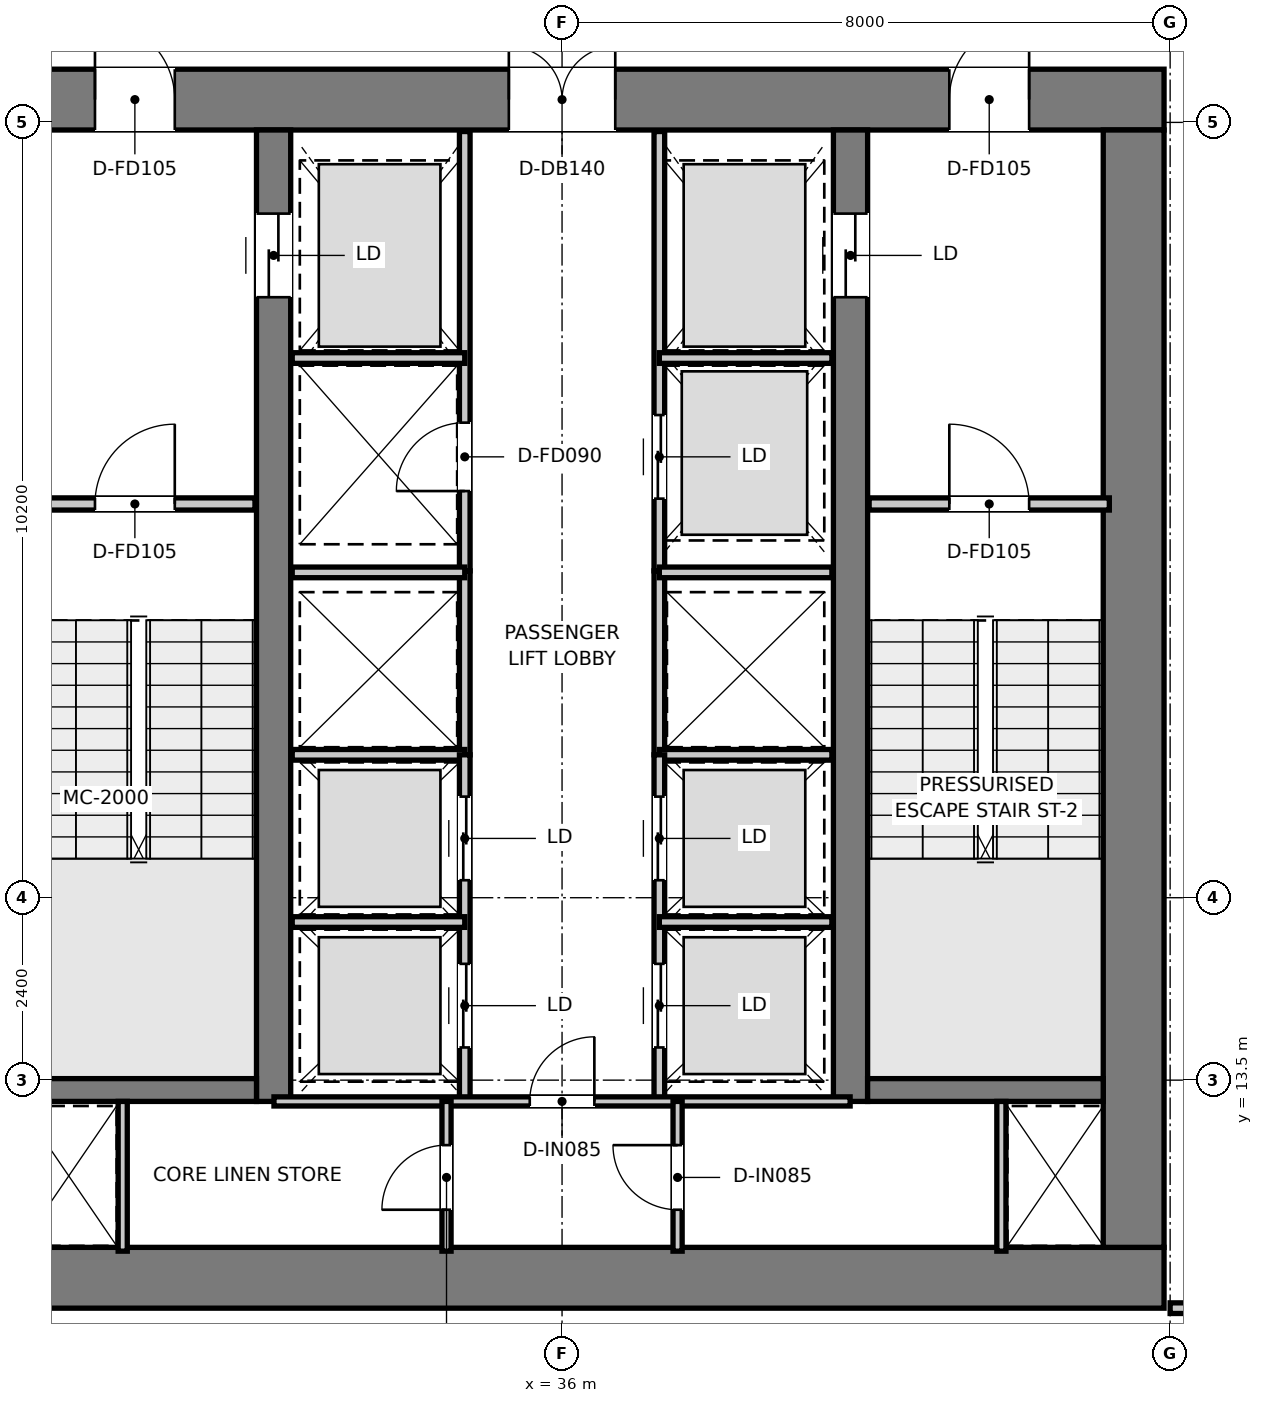
"""IFC4 building model, lengths in metres.
Left out: names, types, materials, properties, quantities, classifications, styles, units other than length and angle.
Written with IfcOpenShell. Run it as: python <this file> out.ifc"""

import sys

from ifc_helpers import new_model, si_unit, direction, frame, frame_2d, origin, place, context, subcontext, project, spatial, rectangle, extrude, element, fill, save


model = new_model("IFC4")
c1 = context("Model", 3, precision=1e-05, world=origin(), true_north=direction((0.0, 1.0)))
c2 = subcontext(c1, "Body", "Model", "MODEL_VIEW")
j1 = project(units=[si_unit("LENGTHUNIT", "METRE"), si_unit("PLANEANGLEUNIT", "RADIAN")], contexts=[c1])
p1 = place(None, origin())
s1 = spatial("IfcSite", under=j1, at=p1, CompositionType="ELEMENT")
p2 = place(p1, origin())
s2 = spatial("IfcBuilding", under=s1, at=p2, CompositionType="ELEMENT")
p3 = place(p2, frame((0.0, 0.0, 109.8)))
s3 = spatial("IfcBuildingStorey", under=s2, at=p3, CompositionType="ELEMENT", Elevation=109.8)
p4 = place(p3, frame((28.08, 10.9, 0.0), z_axis=(0.0, 0.0, 1.0), x_axis=(1.0, 0.0, 0.0)))
e1 = element("IfcWall", 1, at=p4, inside=s3, PredefinedType="SHEAR", context=c2, shape_type="SweptSolid", body=[
    extrude(rectangle(XDim=15.84, YDim=0.8, at=frame_2d((7.92, 0.0))), origin(), (0.0, 0.0, 1.0), 3.95),
])
p5 = place(p3, frame((28.08, 26.4, 0.0), z_axis=(0.0, 0.0, 1.0), x_axis=(1.0, 0.0, 0.0)))
e2 = element("IfcWall", 2, at=p5, inside=s3, PredefinedType="SHEAR", context=c2, shape_type="SweptSolid", body=[
    extrude(rectangle(XDim=15.84, YDim=0.8, at=frame_2d((7.92, 0.0))), origin(), (0.0, 0.0, 1.0), 3.95),
])
p6 = place(p5, frame((7.22, 0.0, 0.0)))
e3 = element("IfcOpeningElement", 3, at=p6, cuts=e2, PredefinedType="OPENING", context=c2, shape_type="SweptSolid", body=[
    extrude(rectangle(XDim=1.4, YDim=2.2, at=frame_2d((0.7, 1.1))), frame((0.0, 0.41, 0.0), z_axis=(0.0, -1.0, 0.0), x_axis=(1.0, 0.0, 0.0)), (0.0, 0.0, 1.0), 0.82),
])
p7 = place(p5, frame((1.775, 0.0, 0.0)))
e4 = element("IfcOpeningElement", 4, at=p7, cuts=e2, PredefinedType="OPENING", context=c2, shape_type="SweptSolid", body=[
    extrude(rectangle(XDim=1.05, YDim=2.1, at=frame_2d((0.525, 1.05))), frame((0.0, 0.41, 0.0), z_axis=(0.0, -1.0, 0.0), x_axis=(1.0, 0.0, 0.0)), (0.0, 0.0, 1.0), 0.82),
])
p8 = place(p5, frame((13.015, 0.0, 0.0)))
e5 = element("IfcOpeningElement", 5, at=p8, cuts=e2, PredefinedType="OPENING", context=c2, shape_type="SweptSolid", body=[
    extrude(rectangle(XDim=1.05, YDim=2.1, at=frame_2d((0.525, 1.05))), frame((0.0, 0.41, 0.0), z_axis=(0.0, -1.0, 0.0), x_axis=(1.0, 0.0, 0.0)), (0.0, 0.0, 1.0), 0.82),
])
p9 = place(p3, frame((43.52, 11.3, 0.0), z_axis=(0.0, 0.0, 1.0), x_axis=(0.0, 1.0, 0.0)))
e6 = element("IfcWall", 6, at=p9, inside=s3, PredefinedType="SHEAR", context=c2, shape_type="SweptSolid", body=[
    extrude(rectangle(XDim=14.7, YDim=0.8, at=frame_2d((7.35, 0.0))), origin(), (0.0, 0.0, 1.0), 3.95),
])
p10 = place(p3, frame((32.205, 13.22, 0.0), z_axis=(0.0, 0.0, 1.0), x_axis=(0.0, 1.0, 0.0)))
e7 = element("IfcWall", 7, at=p10, inside=s3, PredefinedType="SHEAR", context=c2, shape_type="SweptSolid", body=[
    extrude(rectangle(XDim=12.78, YDim=0.45, at=frame_2d((6.39, 0.0))), origin(), (0.0, 0.0, 1.0), 3.95),
])
p11 = place(p10, frame((10.58, 0.0, 0.0)))
e8 = element("IfcOpeningElement", 8, at=p11, cuts=e7, PredefinedType="OPENING", context=c2, shape_type="SweptSolid", body=[
    extrude(rectangle(XDim=1.1, YDim=2.15, at=frame_2d((0.55, 1.075))), frame((0.0, 0.235, 0.0), z_axis=(0.0, -1.0, 0.0), x_axis=(1.0, 0.0, 0.0)), (0.0, 0.0, 1.0), 0.47),
])
p12 = place(p3, frame((39.795, 13.22, 0.0), z_axis=(0.0, 0.0, 1.0), x_axis=(0.0, 1.0, 0.0)))
e9 = element("IfcWall", 9, at=p12, inside=s3, PredefinedType="SHEAR", context=c2, shape_type="SweptSolid", body=[
    extrude(rectangle(XDim=12.78, YDim=0.45, at=frame_2d((6.39, 0.0))), origin(), (0.0, 0.0, 1.0), 3.95),
])
p13 = place(p12, frame((10.58, 0.0, 0.0)))
e10 = element("IfcOpeningElement", 10, at=p13, cuts=e9, PredefinedType="OPENING", context=c2, shape_type="SweptSolid", body=[
    extrude(rectangle(XDim=1.1, YDim=2.15, at=frame_2d((0.55, 1.075))), frame((0.0, 0.235, 0.0), z_axis=(0.0, -1.0, 0.0), x_axis=(1.0, 0.0, 0.0)), (0.0, 0.0, 1.0), 0.47),
])
for number, where, z_axis, x_axis in (
    (11, (28.88, 13.37, 0.0), (0.0, 0.0, 1.0), (1.0, 0.0, 0.0)),
    (12, (40.02, 13.37, 0.0), (0.0, 0.0, 1.0), (1.0, 0.0, 0.0)),
):
    element("IfcWall", number, at=place(p3, frame(where, z_axis=z_axis, x_axis=x_axis)), inside=s3, PredefinedType="SHEAR", context=c2, shape_type="SweptSolid", body=[
        extrude(rectangle(XDim=3.1, YDim=0.3, at=frame_2d((1.55, 0.0))), origin(), (0.0, 0.0, 1.0), 3.95),
    ])
p14 = place(p3, frame((28.8, 21.08, 0.0), z_axis=(0.0, 0.0, 1.0), x_axis=(1.0, 0.0, 0.0)))
e13 = element("IfcWall", 13, at=p14, inside=s3, PredefinedType="PARTITIONING", context=c2, shape_type="SweptSolid", body=[
    extrude(rectangle(XDim=3.16, YDim=0.16, at=frame_2d((1.58, 0.0))), origin(), (0.0, 0.0, 1.0), 3.67),
])
p15 = place(p14, frame((1.055, 0.0, 0.0)))
e14 = element("IfcOpeningElement", 14, at=p15, cuts=e13, PredefinedType="OPENING", context=c2, shape_type="SweptSolid", body=[
    extrude(rectangle(XDim=1.05, YDim=2.1, at=frame_2d((0.525, 1.05))), frame((0.0, 0.09, 0.0), z_axis=(0.0, -1.0, 0.0), x_axis=(1.0, 0.0, 0.0)), (0.0, 0.0, 1.0), 0.18),
])
p16 = place(p3, frame((40.04, 21.08, 0.0), z_axis=(0.0, 0.0, 1.0), x_axis=(1.0, 0.0, 0.0)))
e15 = element("IfcWall", 15, at=p16, inside=s3, PredefinedType="PARTITIONING", context=c2, shape_type="SweptSolid", body=[
    extrude(rectangle(XDim=3.16, YDim=0.16, at=frame_2d((1.58, 0.0))), origin(), (0.0, 0.0, 1.0), 3.67),
])
p17 = place(p16, frame((1.055, 0.0, 0.0)))
e16 = element("IfcOpeningElement", 16, at=p17, cuts=e15, PredefinedType="OPENING", context=c2, shape_type="SweptSolid", body=[
    extrude(rectangle(XDim=1.05, YDim=2.1, at=frame_2d((0.525, 1.05))), frame((0.0, 0.09, 0.0), z_axis=(0.0, -1.0, 0.0), x_axis=(1.0, 0.0, 0.0)), (0.0, 0.0, 1.0), 0.18),
])
p18 = place(p3, frame((34.72, 20.2, 0.0), z_axis=(0.0, 0.0, 1.0), x_axis=(0.0, 1.0, 0.0)))
e17 = element("IfcWall", 17, at=p18, inside=s3, PredefinedType="PARTITIONING", context=c2, shape_type="SweptSolid", body=[
    extrude(rectangle(XDim=5.78, YDim=0.14, at=frame_2d((2.89, 0.0))), origin(), (0.0, 0.0, 1.0), 2.67),
])
p19 = place(p18, frame((1.05, 0.0, 0.0)))
e18 = element("IfcOpeningElement", 18, at=p19, cuts=e17, PredefinedType="OPENING", context=c2, shape_type="SweptSolid", body=[
    extrude(rectangle(XDim=0.9, YDim=2.1, at=frame_2d((0.45, 1.05))), frame((0.0, 0.08, 0.0), z_axis=(0.0, -1.0, 0.0), x_axis=(1.0, 0.0, 0.0)), (0.0, 0.0, 1.0), 0.16),
])
p20 = place(p3, frame((37.28, 20.2, 0.0), z_axis=(0.0, 0.0, 1.0), x_axis=(0.0, 1.0, 0.0)))
e19 = element("IfcWall", 19, at=p20, inside=s3, PredefinedType="PARTITIONING", context=c2, shape_type="SweptSolid", body=[
    extrude(rectangle(XDim=5.78, YDim=0.14, at=frame_2d((2.89, 0.0))), origin(), (0.0, 0.0, 1.0), 2.67),
])
p21 = place(p20, frame((0.95, 0.0, 0.0)))
e20 = element("IfcOpeningElement", 20, at=p21, cuts=e19, PredefinedType="OPENING", context=c2, shape_type="SweptSolid", body=[
    extrude(rectangle(XDim=1.1, YDim=2.15, at=frame_2d((0.55, 1.075))), frame((0.0, 0.08, 0.0), z_axis=(0.0, -1.0, 0.0), x_axis=(1.0, 0.0, 0.0)), (0.0, 0.0, 1.0), 0.16),
])
for number, where, z_axis, x_axis in (
    (21, (32.45, 23.0, 0.0), (0.0, 0.0, 1.0), (1.0, 0.0, 0.0)),
    (22, (37.28, 23.0, 0.0), (0.0, 0.0, 1.0), (1.0, 0.0, 0.0)),
):
    element("IfcWall", number, at=place(p3, frame(where, z_axis=z_axis, x_axis=x_axis)), inside=s3, PredefinedType="PARTITIONING", context=c2, shape_type="SweptSolid", body=[
        extrude(rectangle(XDim=2.27, YDim=0.14, at=frame_2d((1.135, 0.0))), origin(), (0.0, 0.0, 1.0), 2.67),
    ])
for number, where, z_axis, x_axis in (
    (23, (34.72, 17.78, 0.0), (0.0, 0.0, 1.0), (0.0, 1.0, 0.0)),
    (24, (37.28, 17.78, 0.0), (0.0, 0.0, 1.0), (0.0, 1.0, 0.0)),
):
    element("IfcWall", number, at=place(p3, frame(where, z_axis=z_axis, x_axis=x_axis)), inside=s3, PredefinedType="PARTITIONING", context=c2, shape_type="SweptSolid", body=[
        extrude(rectangle(XDim=2.42, YDim=0.14, at=frame_2d((1.21, 0.0))), origin(), (0.0, 0.0, 1.0), 3.67),
    ])
for number, where, z_axis, x_axis in (
    (25, (32.45, 17.78, 0.0), (0.0, 0.0, 1.0), (1.0, 0.0, 0.0)),
    (26, (32.45, 20.18, 0.0), (0.0, 0.0, 1.0), (1.0, 0.0, 0.0)),
    (27, (37.28, 17.78, 0.0), (0.0, 0.0, 1.0), (1.0, 0.0, 0.0)),
    (28, (37.28, 20.18, 0.0), (0.0, 0.0, 1.0), (1.0, 0.0, 0.0)),
):
    element("IfcWall", number, at=place(p3, frame(where, z_axis=z_axis, x_axis=x_axis)), inside=s3, PredefinedType="PARTITIONING", context=c2, shape_type="SweptSolid", body=[
        extrude(rectangle(XDim=2.27, YDim=0.14, at=frame_2d((1.135, 0.0))), origin(), (0.0, 0.0, 1.0), 3.67),
    ])
p22 = place(p3, frame((34.72, 13.22, 0.0), z_axis=(0.0, 0.0, 1.0), x_axis=(0.0, 1.0, 0.0)))
e29 = element("IfcWall", 29, at=p22, inside=s3, PredefinedType="PARTITIONING", context=c2, shape_type="SweptSolid", body=[
    extrude(rectangle(XDim=4.56, YDim=0.14, at=frame_2d((2.28, 0.0))), origin(), (0.0, 0.0, 1.0), 3.67),
])
p23 = place(p22, frame((0.71, 0.0, 0.0)))
e30 = element("IfcOpeningElement", 30, at=p23, cuts=e29, PredefinedType="OPENING", context=c2, shape_type="SweptSolid", body=[
    extrude(rectangle(XDim=1.1, YDim=2.15, at=frame_2d((0.55, 1.075))), frame((0.0, 0.08, 0.0), z_axis=(0.0, -1.0, 0.0), x_axis=(1.0, 0.0, 0.0)), (0.0, 0.0, 1.0), 0.16),
])
p24 = place(p22, frame((2.91, 0.0, 0.0)))
e31 = element("IfcOpeningElement", 31, at=p24, cuts=e29, PredefinedType="OPENING", context=c2, shape_type="SweptSolid", body=[
    extrude(rectangle(XDim=1.1, YDim=2.15, at=frame_2d((0.55, 1.075))), frame((0.0, 0.08, 0.0), z_axis=(0.0, -1.0, 0.0), x_axis=(1.0, 0.0, 0.0)), (0.0, 0.0, 1.0), 0.16),
])
p25 = place(p3, frame((32.45, 15.58, 0.0), z_axis=(0.0, 0.0, 1.0), x_axis=(1.0, 0.0, 0.0)))
e32 = element("IfcWall", 32, at=p25, inside=s3, PredefinedType="PARTITIONING", context=c2, shape_type="SweptSolid", body=[
    extrude(rectangle(XDim=2.27, YDim=0.14, at=frame_2d((1.135, 0.0))), origin(), (0.0, 0.0, 1.0), 3.67),
])
p26 = place(p3, frame((37.28, 13.22, 0.0), z_axis=(0.0, 0.0, 1.0), x_axis=(0.0, 1.0, 0.0)))
e33 = element("IfcWall", 33, at=p26, inside=s3, PredefinedType="PARTITIONING", context=c2, shape_type="SweptSolid", body=[
    extrude(rectangle(XDim=4.56, YDim=0.14, at=frame_2d((2.28, 0.0))), origin(), (0.0, 0.0, 1.0), 3.67),
])
p27 = place(p26, frame((0.71, 0.0, 0.0)))
e34 = element("IfcOpeningElement", 34, at=p27, cuts=e33, PredefinedType="OPENING", context=c2, shape_type="SweptSolid", body=[
    extrude(rectangle(XDim=1.1, YDim=2.15, at=frame_2d((0.55, 1.075))), frame((0.0, 0.08, 0.0), z_axis=(0.0, -1.0, 0.0), x_axis=(1.0, 0.0, 0.0)), (0.0, 0.0, 1.0), 0.16),
])
p28 = place(p26, frame((2.91, 0.0, 0.0)))
e35 = element("IfcOpeningElement", 35, at=p28, cuts=e33, PredefinedType="OPENING", context=c2, shape_type="SweptSolid", body=[
    extrude(rectangle(XDim=1.1, YDim=2.15, at=frame_2d((0.55, 1.075))), frame((0.0, 0.08, 0.0), z_axis=(0.0, -1.0, 0.0), x_axis=(1.0, 0.0, 0.0)), (0.0, 0.0, 1.0), 0.16),
])
p29 = place(p3, frame((37.28, 15.58, 0.0), z_axis=(0.0, 0.0, 1.0), x_axis=(1.0, 0.0, 0.0)))
e36 = element("IfcWall", 36, at=p29, inside=s3, PredefinedType="PARTITIONING", context=c2, shape_type="SweptSolid", body=[
    extrude(rectangle(XDim=2.27, YDim=0.14, at=frame_2d((1.135, 0.0))), origin(), (0.0, 0.0, 1.0), 3.67),
])
for number, where, z_axis, x_axis in (
    (37, (30.22, 11.25, 0.0), (0.0, 0.0, 1.0), (0.0, 1.0, 0.0)),
    (38, (41.78, 11.25, 0.0), (0.0, 0.0, 1.0), (0.0, 1.0, 0.0)),
):
    element("IfcWall", number, at=place(p3, frame(where, z_axis=z_axis, x_axis=x_axis)), inside=s3, PredefinedType="PARTITIONING", context=c2, shape_type="SweptSolid", body=[
        extrude(rectangle(XDim=1.97, YDim=0.12, at=frame_2d((0.985, 0.0))), origin(), (0.0, 0.0, 1.0), 3.67),
    ])
p30 = place(p3, frame((32.21, 13.22, 0.0), z_axis=(0.0, 0.0, 1.0), x_axis=(1.0, 0.0, 0.0)))
e39 = element("IfcWall", 39, at=p30, inside=s3, PredefinedType="PARTITIONING", context=c2, shape_type="SweptSolid", body=[
    extrude(rectangle(XDim=7.58, YDim=0.12, at=frame_2d((3.79, 0.0))), origin(), (0.0, 0.0, 1.0), 3.67),
])
p31 = place(p30, frame((3.365, 0.0, 0.0)))
e40 = element("IfcOpeningElement", 40, at=p31, cuts=e39, PredefinedType="OPENING", context=c2, shape_type="SweptSolid", body=[
    extrude(rectangle(XDim=0.85, YDim=2.1, at=frame_2d((0.425, 1.05))), frame((0.0, 0.07, 0.0), z_axis=(0.0, -1.0, 0.0), x_axis=(1.0, 0.0, 0.0)), (0.0, 0.0, 1.0), 0.14),
])
p32 = place(p3, frame((34.48, 11.25, 0.0), z_axis=(0.0, 0.0, 1.0), x_axis=(0.0, 1.0, 0.0)))
e41 = element("IfcWall", 41, at=p32, inside=s3, PredefinedType="PARTITIONING", context=c2, shape_type="SweptSolid", body=[
    extrude(rectangle(XDim=1.97, YDim=0.12, at=frame_2d((0.985, 0.0))), origin(), (0.0, 0.0, 1.0), 3.67),
])
p33 = place(p32, frame((0.545, 0.0, 0.0)))
e42 = element("IfcOpeningElement", 42, at=p33, cuts=e41, PredefinedType="OPENING", context=c2, shape_type="SweptSolid", body=[
    extrude(rectangle(XDim=0.85, YDim=2.1, at=frame_2d((0.425, 1.05))), frame((0.0, 0.07, 0.0), z_axis=(0.0, -1.0, 0.0), x_axis=(1.0, 0.0, 0.0)), (0.0, 0.0, 1.0), 0.14),
])
p34 = place(p3, frame((37.52, 11.25, 0.0), z_axis=(0.0, 0.0, 1.0), x_axis=(0.0, 1.0, 0.0)))
e43 = element("IfcWall", 43, at=p34, inside=s3, PredefinedType="PARTITIONING", context=c2, shape_type="SweptSolid", body=[
    extrude(rectangle(XDim=1.97, YDim=0.12, at=frame_2d((0.985, 0.0))), origin(), (0.0, 0.0, 1.0), 3.67),
])
p35 = place(p34, frame((0.545, 0.0, 0.0)))
e44 = element("IfcOpeningElement", 44, at=p35, cuts=e43, PredefinedType="OPENING", context=c2, shape_type="SweptSolid", body=[
    extrude(rectangle(XDim=0.85, YDim=2.1, at=frame_2d((0.425, 1.05))), frame((0.0, 0.07, 0.0), z_axis=(0.0, -1.0, 0.0), x_axis=(1.0, 0.0, 0.0)), (0.0, 0.0, 1.0), 0.14),
])
p36 = place(p3, frame((44.0, 10.5, 0.0), z_axis=(0.0, 0.0, 1.0), x_axis=(1.0, 0.0, 0.0)))
e45 = element("IfcWall", 45, at=p36, inside=s3, PredefinedType="PARTITIONING", context=c2, shape_type="SweptSolid", body=[
    extrude(rectangle(XDim=1.68, YDim=0.14, at=frame_2d((0.84, 0.0))), origin(), (0.0, 0.0, 1.0), 3.67),
])
p37 = place(p15, origin())
e46 = element("IfcDoor", 46, at=p37, inside=s3, OperationType="SINGLE_SWING_RIGHT", PredefinedType="DOOR", context=c2, shape_type="SweptSolid", body=[
    extrude(rectangle(XDim=1.05, YDim=2.1, at=frame_2d((0.525, 1.05))), frame((0.0, 0.025, 0.0), z_axis=(0.0, -1.0, 0.0), x_axis=(1.0, 0.0, 0.0)), (0.0, 0.0, 1.0), 0.05),
])
fill(e14, e46)
p38 = place(p17, origin())
e47 = element("IfcDoor", 47, at=p38, inside=s3, OperationType="SINGLE_SWING_LEFT", PredefinedType="DOOR", context=c2, shape_type="SweptSolid", body=[
    extrude(rectangle(XDim=1.05, YDim=2.1, at=frame_2d((0.525, 1.05))), frame((0.0, 0.025, 0.0), z_axis=(0.0, -1.0, 0.0), x_axis=(1.0, 0.0, 0.0)), (0.0, 0.0, 1.0), 0.05),
])
fill(e16, e47)
p39 = place(p6, origin())
e48 = element("IfcDoor", 48, at=p39, inside=s3, OperationType="DOUBLE_DOOR_SINGLE_SWING", PredefinedType="DOOR", context=c2, shape_type="SweptSolid", body=[
    extrude(rectangle(XDim=1.4, YDim=2.2, at=frame_2d((0.7, 1.1))), frame((0.0, 0.025, 0.0), z_axis=(0.0, -1.0, 0.0), x_axis=(1.0, 0.0, 0.0)), (0.0, 0.0, 1.0), 0.05),
])
fill(e3, e48)
p40 = place(p7, origin())
e49 = element("IfcDoor", 49, at=p40, inside=s3, OperationType="SINGLE_SWING_LEFT", PredefinedType="DOOR", context=c2, shape_type="SweptSolid", body=[
    extrude(rectangle(XDim=1.05, YDim=2.1, at=frame_2d((0.525, 1.05))), frame((0.0, 0.025, 0.0), z_axis=(0.0, -1.0, 0.0), x_axis=(1.0, 0.0, 0.0)), (0.0, 0.0, 1.0), 0.05),
])
fill(e4, e49)
p41 = place(p8, origin())
e50 = element("IfcDoor", 50, at=p41, inside=s3, OperationType="SINGLE_SWING_RIGHT", PredefinedType="DOOR", context=c2, shape_type="SweptSolid", body=[
    extrude(rectangle(XDim=1.05, YDim=2.1, at=frame_2d((0.525, 1.05))), frame((0.0, 0.025, 0.0), z_axis=(0.0, -1.0, 0.0), x_axis=(1.0, 0.0, 0.0)), (0.0, 0.0, 1.0), 0.05),
])
fill(e5, e50)
p42 = place(p11, origin())
e51 = element("IfcDoor", 51, at=p42, inside=s3, OperationType="DOUBLE_DOOR_SLIDING", PredefinedType="DOOR", context=c2, shape_type="SweptSolid", body=[
    extrude(rectangle(XDim=1.1, YDim=2.15, at=frame_2d((0.55, 1.075))), frame((0.0, 0.025, 0.0), z_axis=(0.0, -1.0, 0.0), x_axis=(1.0, 0.0, 0.0)), (0.0, 0.0, 1.0), 0.05),
])
fill(e8, e51)
p43 = place(p13, origin())
e52 = element("IfcDoor", 52, at=p43, inside=s3, OperationType="DOUBLE_DOOR_SLIDING", PredefinedType="DOOR", context=c2, shape_type="SweptSolid", body=[
    extrude(rectangle(XDim=1.1, YDim=2.15, at=frame_2d((0.55, 1.075))), frame((0.0, 0.025, 0.0), z_axis=(0.0, -1.0, 0.0), x_axis=(1.0, 0.0, 0.0)), (0.0, 0.0, 1.0), 0.05),
])
fill(e10, e52)
p44 = place(p19, origin())
e53 = element("IfcDoor", 53, at=p44, inside=s3, OperationType="SINGLE_SWING_LEFT", PredefinedType="DOOR", context=c2, shape_type="SweptSolid", body=[
    extrude(rectangle(XDim=0.9, YDim=2.1, at=frame_2d((0.45, 1.05))), frame((0.0, 0.025, 0.0), z_axis=(0.0, -1.0, 0.0), x_axis=(1.0, 0.0, 0.0)), (0.0, 0.0, 1.0), 0.05),
])
fill(e18, e53)
p45 = place(p21, origin())
e54 = element("IfcDoor", 54, at=p45, inside=s3, OperationType="DOUBLE_DOOR_SLIDING", PredefinedType="DOOR", context=c2, shape_type="SweptSolid", body=[
    extrude(rectangle(XDim=1.1, YDim=2.15, at=frame_2d((0.55, 1.075))), frame((0.0, 0.025, 0.0), z_axis=(0.0, -1.0, 0.0), x_axis=(1.0, 0.0, 0.0)), (0.0, 0.0, 1.0), 0.05),
])
fill(e20, e54)
p46 = place(p23, origin())
e55 = element("IfcDoor", 55, at=p46, inside=s3, OperationType="DOUBLE_DOOR_SLIDING", PredefinedType="DOOR", context=c2, shape_type="SweptSolid", body=[
    extrude(rectangle(XDim=1.1, YDim=2.15, at=frame_2d((0.55, 1.075))), frame((0.0, 0.025, 0.0), z_axis=(0.0, -1.0, 0.0), x_axis=(1.0, 0.0, 0.0)), (0.0, 0.0, 1.0), 0.05),
])
fill(e30, e55)
p47 = place(p24, origin())
e56 = element("IfcDoor", 56, at=p47, inside=s3, OperationType="DOUBLE_DOOR_SLIDING", PredefinedType="DOOR", context=c2, shape_type="SweptSolid", body=[
    extrude(rectangle(XDim=1.1, YDim=2.15, at=frame_2d((0.55, 1.075))), frame((0.0, 0.025, 0.0), z_axis=(0.0, -1.0, 0.0), x_axis=(1.0, 0.0, 0.0)), (0.0, 0.0, 1.0), 0.05),
])
fill(e31, e56)
p48 = place(p27, origin())
e57 = element("IfcDoor", 57, at=p48, inside=s3, OperationType="DOUBLE_DOOR_SLIDING", PredefinedType="DOOR", context=c2, shape_type="SweptSolid", body=[
    extrude(rectangle(XDim=1.1, YDim=2.15, at=frame_2d((0.55, 1.075))), frame((0.0, 0.025, 0.0), z_axis=(0.0, -1.0, 0.0), x_axis=(1.0, 0.0, 0.0)), (0.0, 0.0, 1.0), 0.05),
])
fill(e34, e57)
p49 = place(p28, origin())
e58 = element("IfcDoor", 58, at=p49, inside=s3, OperationType="DOUBLE_DOOR_SLIDING", PredefinedType="DOOR", context=c2, shape_type="SweptSolid", body=[
    extrude(rectangle(XDim=1.1, YDim=2.15, at=frame_2d((0.55, 1.075))), frame((0.0, 0.025, 0.0), z_axis=(0.0, -1.0, 0.0), x_axis=(1.0, 0.0, 0.0)), (0.0, 0.0, 1.0), 0.05),
])
fill(e35, e58)
p50 = place(p31, origin())
e59 = element("IfcDoor", 59, at=p50, inside=s3, OperationType="SINGLE_SWING_RIGHT", PredefinedType="DOOR", context=c2, shape_type="SweptSolid", body=[
    extrude(rectangle(XDim=0.85, YDim=2.1, at=frame_2d((0.425, 1.05))), frame((0.0, 0.025, 0.0), z_axis=(0.0, -1.0, 0.0), x_axis=(1.0, 0.0, 0.0)), (0.0, 0.0, 1.0), 0.05),
])
fill(e40, e59)
p51 = place(p33, origin())
e60 = element("IfcDoor", 60, at=p51, inside=s3, OperationType="SINGLE_SWING_LEFT", PredefinedType="DOOR", context=c2, shape_type="SweptSolid", body=[
    extrude(rectangle(XDim=0.85, YDim=2.1, at=frame_2d((0.425, 1.05))), frame((0.0, 0.025, 0.0), z_axis=(0.0, -1.0, 0.0), x_axis=(1.0, 0.0, 0.0)), (0.0, 0.0, 1.0), 0.05),
])
fill(e42, e60)
p52 = place(p35, origin())
e61 = element("IfcDoor", 61, at=p52, inside=s3, OperationType="SINGLE_SWING_RIGHT", PredefinedType="DOOR", context=c2, shape_type="SweptSolid", body=[
    extrude(rectangle(XDim=0.85, YDim=2.1, at=frame_2d((0.425, 1.05))), frame((0.0, 0.025, 0.0), z_axis=(0.0, -1.0, 0.0), x_axis=(1.0, 0.0, 0.0)), (0.0, 0.0, 1.0), 0.05),
])
fill(e44, e61)
save(model, sys.argv[1])
